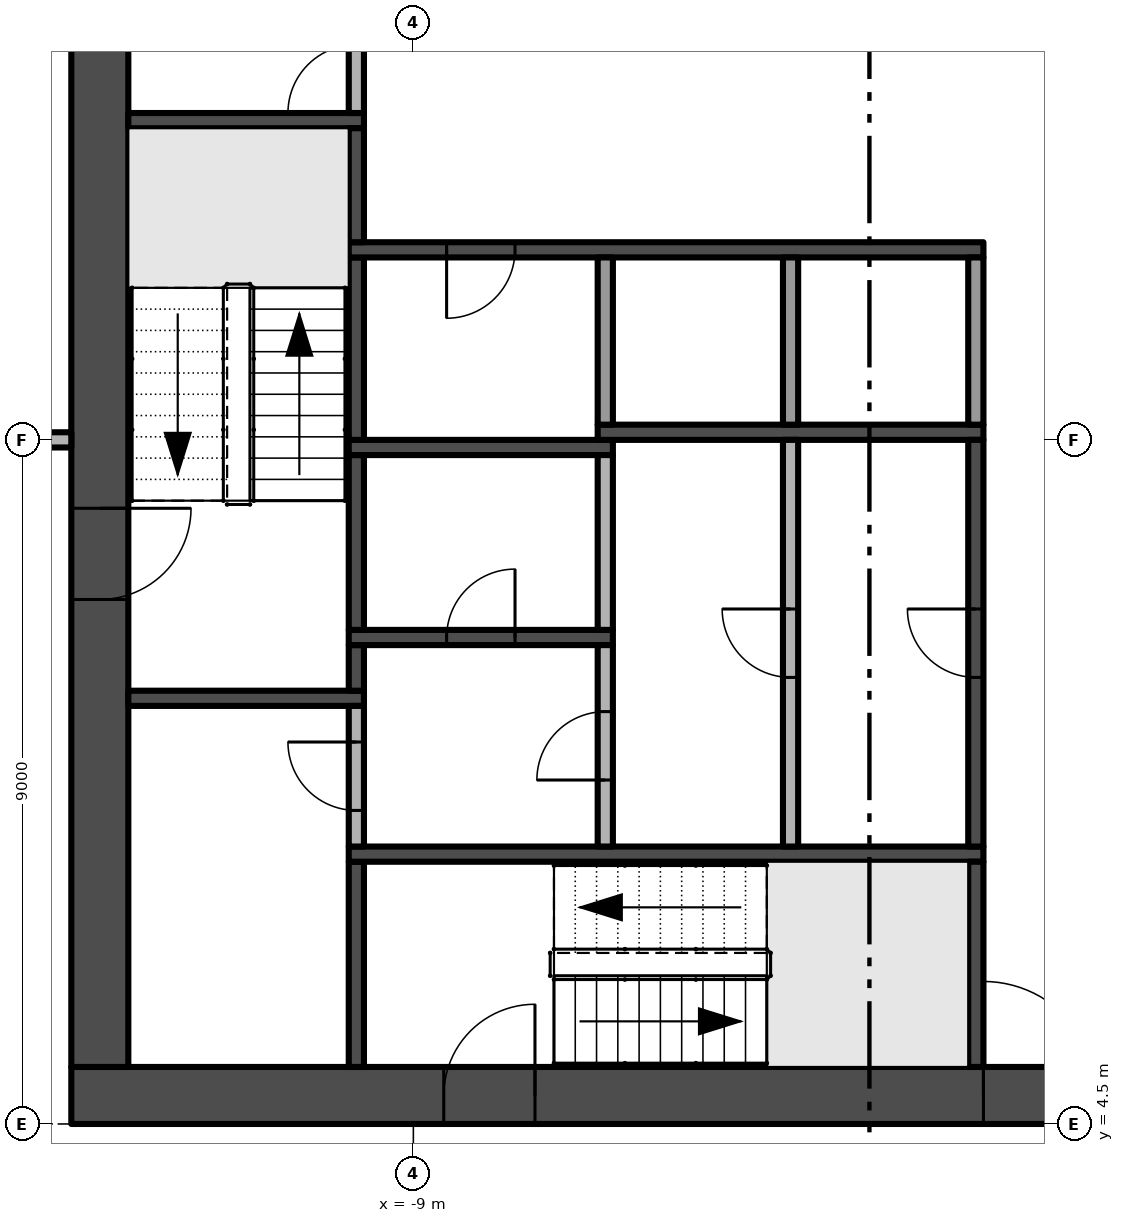
"""IFC4 building model, lengths in metres.
Left out: names, types, materials, properties, quantities, classifications, styles, units other than length and angle.
Written with IfcOpenShell. Run it as: python <this file> out.ifc"""

import sys

from ifc_helpers import new_model, si_unit, direction, frame, frame_2d, origin, place, context, subcontext, project, spatial, rectangle, extrude, element, fill, save


model = new_model("IFC4")
c1 = context("Model", 3, precision=1e-05, world=origin(), true_north=direction((0.0, 1.0)))
c2 = subcontext(c1, "Body", "Model", "MODEL_VIEW")
j1 = project(units=[si_unit("LENGTHUNIT", "METRE"), si_unit("PLANEANGLEUNIT", "RADIAN")], contexts=[c1])
p1 = place(None, origin())
s1 = spatial("IfcSite", under=j1, at=p1, CompositionType="ELEMENT")
p2 = place(p1, origin())
s2 = spatial("IfcBuilding", under=s1, at=p2, CompositionType="ELEMENT")
p3 = place(p2, frame((0.0, 0.0, 132.6)))
s3 = spatial("IfcBuildingStorey", under=s2, at=p3, CompositionType="ELEMENT", Elevation=132.6)
p4 = place(p3, frame((-13.5, 4.875, -0.3), z_axis=(0.0, 0.0, 1.0), x_axis=(1.0, 0.0, 0.0)))
e1 = element("IfcWall", 1, at=p4, inside=s3, PredefinedType="SHEAR", context=c2, shape_type="SweptSolid", body=[
    extrude(rectangle(XDim=27.0, YDim=0.75, at=frame_2d((13.5, 0.0))), origin(), (0.0, 0.0, 1.0), 3.8),
])
p5 = place(p4, frame((12.0, 0.0, 0.3)))
e2 = element("IfcOpeningElement", 2, at=p5, cuts=e1, PredefinedType="OPENING", context=c2, shape_type="SweptSolid", body=[
    extrude(rectangle(XDim=3.0, YDim=2.4, at=frame_2d((1.5, 1.2))), frame((0.0, 0.385, 0.0), z_axis=(0.0, -1.0, 0.0), x_axis=(1.0, 0.0, 0.0)), (0.0, 0.0, 1.0), 0.77),
])
p6 = place(p4, frame((4.9, 0.0, 0.3)))
e3 = element("IfcOpeningElement", 3, at=p6, cuts=e1, PredefinedType="OPENING", context=c2, shape_type="SweptSolid", body=[
    extrude(rectangle(XDim=1.2, YDim=2.2, at=frame_2d((0.6, 1.1))), frame((0.0, 0.385, 0.0), z_axis=(0.0, -1.0, 0.0), x_axis=(1.0, 0.0, 0.0)), (0.0, 0.0, 1.0), 0.77),
])
p7 = place(p4, frame((20.75, 0.0, 0.3)))
e4 = element("IfcOpeningElement", 4, at=p7, cuts=e1, PredefinedType="OPENING", context=c2, shape_type="SweptSolid", body=[
    extrude(rectangle(XDim=1.5, YDim=2.2, at=frame_2d((0.75, 1.1))), frame((0.0, 0.385, 0.0), z_axis=(0.0, -1.0, 0.0), x_axis=(1.0, 0.0, 0.0)), (0.0, 0.0, 1.0), 0.77),
])
p8 = place(p4, frame((17.4, 0.0, 0.3)))
e5 = element("IfcOpeningElement", 5, at=p8, cuts=e1, PredefinedType="OPENING", context=c2, shape_type="SweptSolid", body=[
    extrude(rectangle(XDim=1.2, YDim=2.2, at=frame_2d((0.6, 1.1))), frame((0.0, 0.385, 0.0), z_axis=(0.0, -1.0, 0.0), x_axis=(1.0, 0.0, 0.0)), (0.0, 0.0, 1.0), 0.77),
])
p9 = place(p3, frame((-13.125, 21.75, -0.3), z_axis=(0.0, 0.0, 1.0), x_axis=(0.0, -1.0, 0.0)))
e6 = element("IfcWall", 6, at=p9, inside=s3, PredefinedType="SHEAR", context=c2, shape_type="SweptSolid", body=[
    extrude(rectangle(XDim=16.5, YDim=0.75, at=frame_2d((8.25, 0.0))), origin(), (0.0, 0.0, 1.0), 3.8),
])
p10 = place(p9, frame((9.15, 0.0, 0.3)))
e7 = element("IfcOpeningElement", 7, at=p10, cuts=e6, PredefinedType="OPENING", context=c2, shape_type="SweptSolid", body=[
    extrude(rectangle(XDim=1.2, YDim=2.2, at=frame_2d((0.6, 1.1))), frame((0.0, 0.385, 0.0), z_axis=(0.0, -1.0, 0.0), x_axis=(1.0, 0.0, 0.0)), (0.0, 0.0, 1.0), 0.77),
])
for number, where, z_axis, x_axis in (
    (8, (-12.75, 10.1, 0.0), (0.0, 0.0, 1.0), (1.0, 0.0, 0.0)),
    (9, (-12.75, 17.7, 0.0), (0.0, 0.0, 1.0), (1.0, 0.0, 0.0)),
):
    element("IfcWall", number, at=place(p3, frame(where, z_axis=z_axis, x_axis=x_axis)), inside=s3, PredefinedType="SHEAR", context=c2, shape_type="SweptSolid", body=[
        extrude(rectangle(XDim=3.1, YDim=0.2, at=frame_2d((1.55, 0.0))), origin(), (0.0, 0.0, 1.0), 3.5),
    ])
p11 = place(p3, frame((-9.75, 5.25, 0.0), z_axis=(0.0, 0.0, 1.0), x_axis=(0.0, 1.0, 0.0)))
e10 = element("IfcWall", 10, at=p11, inside=s3, PredefinedType="SHEAR", context=c2, shape_type="SweptSolid", body=[
    extrude(rectangle(XDim=2.7, YDim=0.2, at=frame_2d((1.35, 0.0))), origin(), (0.0, 0.0, 1.0), 3.5),
])
p12 = place(p3, frame((-9.85, 8.05, 0.0), z_axis=(0.0, 0.0, 1.0), x_axis=(1.0, 0.0, 0.0)))
e11 = element("IfcWall", 11, at=p12, inside=s3, PredefinedType="SHEAR", context=c2, shape_type="SweptSolid", body=[
    extrude(rectangle(XDim=8.35, YDim=0.2, at=frame_2d((4.175, 0.0))), origin(), (0.0, 0.0, 1.0), 3.5),
])
p13 = place(p3, frame((-9.75, 8.15, 0.0), z_axis=(0.0, 0.0, 1.0), x_axis=(0.0, 1.0, 0.0)))
e12 = element("IfcWall", 12, at=p13, inside=s3, PredefinedType="PARTITIONING", context=c2, shape_type="SweptSolid", body=[
    extrude(rectangle(XDim=1.85, YDim=0.2, at=frame_2d((0.925, 0.0))), origin(), (0.0, 0.0, 1.0), 3.5),
])
p14 = place(p13, frame((0.475, 0.0, 0.0)))
e13 = element("IfcOpeningElement", 13, at=p14, cuts=e12, PredefinedType="OPENING", context=c2, shape_type="SweptSolid", body=[
    extrude(rectangle(XDim=0.9, YDim=2.1, at=frame_2d((0.45, 1.05))), frame((0.0, 0.11, 0.0), z_axis=(0.0, -1.0, 0.0), x_axis=(1.0, 0.0, 0.0)), (0.0, 0.0, 1.0), 0.22),
])
p15 = place(p3, frame((-9.75, 10.2, 0.0), z_axis=(0.0, 0.0, 1.0), x_axis=(0.0, 1.0, 0.0)))
e14 = element("IfcWall", 14, at=p15, inside=s3, PredefinedType="SHEAR", context=c2, shape_type="SweptSolid", body=[
    extrude(rectangle(XDim=0.6, YDim=0.2, at=frame_2d((0.3, 0.0))), origin(), (0.0, 0.0, 1.0), 3.5),
])
p16 = place(p3, frame((-9.85, 10.9, 0.0), z_axis=(0.0, 0.0, 1.0), x_axis=(1.0, 0.0, 0.0)))
e15 = element("IfcWall", 15, at=p16, inside=s3, PredefinedType="SHEAR", context=c2, shape_type="SweptSolid", body=[
    extrude(rectangle(XDim=3.475, YDim=0.2, at=frame_2d((1.738, 0.0))), origin(), (0.0, 0.0, 1.0), 3.5),
])
p17 = place(p16, frame((1.288, 0.0, 0.0)))
e16 = element("IfcOpeningElement", 16, at=p17, cuts=e15, PredefinedType="OPENING", context=c2, shape_type="SweptSolid", body=[
    extrude(rectangle(XDim=0.9, YDim=2.1, at=frame_2d((0.45, 1.05))), frame((0.0, 0.11, 0.0), z_axis=(0.0, -1.0, 0.0), x_axis=(1.0, 0.0, 0.0)), (0.0, 0.0, 1.0), 0.22),
])
p18 = place(p3, frame((-9.75, 11.0, 0.0), z_axis=(0.0, 0.0, 1.0), x_axis=(0.0, 1.0, 0.0)))
e17 = element("IfcWall", 17, at=p18, inside=s3, PredefinedType="SHEAR", context=c2, shape_type="SweptSolid", body=[
    extrude(rectangle(XDim=2.3, YDim=0.2, at=frame_2d((1.15, 0.0))), origin(), (0.0, 0.0, 1.0), 3.5),
])
p19 = place(p3, frame((-9.85, 13.4, 0.0), z_axis=(0.0, 0.0, 1.0), x_axis=(1.0, 0.0, 0.0)))
e18 = element("IfcWall", 18, at=p19, inside=s3, PredefinedType="SHEAR", context=c2, shape_type="SweptSolid", body=[
    extrude(rectangle(XDim=3.475, YDim=0.2, at=frame_2d((1.738, 0.0))), origin(), (0.0, 0.0, 1.0), 3.5),
])
p20 = place(p3, frame((-9.75, 13.5, 0.0), z_axis=(0.0, 0.0, 1.0), x_axis=(0.0, 1.0, 0.0)))
e19 = element("IfcWall", 19, at=p20, inside=s3, PredefinedType="SHEAR", context=c2, shape_type="SweptSolid", body=[
    extrude(rectangle(XDim=2.4, YDim=0.2, at=frame_2d((1.2, 0.0))), origin(), (0.0, 0.0, 1.0), 3.5),
])
p21 = place(p3, frame((-1.5, 16.0, 0.0), z_axis=(0.0, 0.0, 1.0), x_axis=(-1.0, 0.0, 0.0)))
e20 = element("IfcWall", 20, at=p21, inside=s3, PredefinedType="SHEAR", context=c2, shape_type="SweptSolid", body=[
    extrude(rectangle(XDim=8.35, YDim=0.2, at=frame_2d((4.175, 0.0))), origin(), (0.0, 0.0, 1.0), 3.5),
])
p22 = place(p21, frame((6.162, 0.0, 0.0)))
e21 = element("IfcOpeningElement", 21, at=p22, cuts=e20, PredefinedType="OPENING", context=c2, shape_type="SweptSolid", body=[
    extrude(rectangle(XDim=0.9, YDim=2.1, at=frame_2d((0.45, 1.05))), frame((0.0, 0.11, 0.0), z_axis=(0.0, -1.0, 0.0), x_axis=(1.0, 0.0, 0.0)), (0.0, 0.0, 1.0), 0.22),
])
p23 = place(p3, frame((-9.75, 16.1, 0.0), z_axis=(0.0, 0.0, 1.0), x_axis=(0.0, 1.0, 0.0)))
e22 = element("IfcWall", 22, at=p23, inside=s3, PredefinedType="SHEAR", context=c2, shape_type="SweptSolid", body=[
    extrude(rectangle(XDim=1.5, YDim=0.2, at=frame_2d((0.75, 0.0))), origin(), (0.0, 0.0, 1.0), 3.5),
])
p24 = place(p3, frame((-9.75, 17.8, 0.0), z_axis=(0.0, 0.0, 1.0), x_axis=(0.0, 1.0, 0.0)))
e23 = element("IfcWall", 23, at=p24, inside=s3, PredefinedType="PARTITIONING", context=c2, shape_type="SweptSolid", body=[
    extrude(rectangle(XDim=1.4, YDim=0.2, at=frame_2d((0.7, 0.0))), origin(), (0.0, 0.0, 1.0), 3.5),
])
p25 = place(p24, origin())
e24 = element("IfcOpeningElement", 24, at=p25, cuts=e23, PredefinedType="OPENING", context=c2, shape_type="SweptSolid", body=[
    extrude(rectangle(XDim=0.9, YDim=2.1, at=frame_2d((0.45, 1.05))), frame((0.0, 0.11, 0.0), z_axis=(0.0, -1.0, 0.0), x_axis=(1.0, 0.0, 0.0)), (0.0, 0.0, 1.0), 0.22),
])
p26 = place(p3, frame((-6.475, 8.15, 0.0), z_axis=(0.0, 0.0, 1.0), x_axis=(0.0, 1.0, 0.0)))
e25 = element("IfcWall", 25, at=p26, inside=s3, PredefinedType="PARTITIONING", context=c2, shape_type="SweptSolid", body=[
    extrude(rectangle(XDim=2.65, YDim=0.2, at=frame_2d((1.325, 0.0))), origin(), (0.0, 0.0, 1.0), 3.5),
])
p27 = place(p26, frame((0.875, 0.0, 0.0)))
e26 = element("IfcOpeningElement", 26, at=p27, cuts=e25, PredefinedType="OPENING", context=c2, shape_type="SweptSolid", body=[
    extrude(rectangle(XDim=0.9, YDim=2.1, at=frame_2d((0.45, 1.05))), frame((0.0, 0.11, 0.0), z_axis=(0.0, -1.0, 0.0), x_axis=(1.0, 0.0, 0.0)), (0.0, 0.0, 1.0), 0.22),
])
p28 = place(p3, frame((-6.475, 11.0, 0.0), z_axis=(0.0, 0.0, 1.0), x_axis=(0.0, 1.0, 0.0)))
e27 = element("IfcWall", 27, at=p28, inside=s3, PredefinedType="PARTITIONING", context=c2, shape_type="SweptSolid", body=[
    extrude(rectangle(XDim=2.3, YDim=0.2, at=frame_2d((1.15, 0.0))), origin(), (0.0, 0.0, 1.0), 3.5),
])
p29 = place(p3, frame((-6.575, 13.6, 0.0), z_axis=(0.0, 0.0, 1.0), x_axis=(1.0, 0.0, 0.0)))
e28 = element("IfcWall", 28, at=p29, inside=s3, PredefinedType="SHEAR", context=c2, shape_type="SweptSolid", body=[
    extrude(rectangle(XDim=5.075, YDim=0.2, at=frame_2d((2.538, 0.0))), origin(), (0.0, 0.0, 1.0), 3.5),
])
p30 = place(p3, frame((-6.475, 13.7, 0.0), z_axis=(0.0, 0.0, 1.0), x_axis=(0.0, 1.0, 0.0)))
e29 = element("IfcWall", 29, at=p30, inside=s3, PredefinedType="PARTITIONING", context=c2, shape_type="SweptSolid", body=[
    extrude(rectangle(XDim=2.2, YDim=0.2, at=frame_2d((1.1, 0.0))), origin(), (0.0, 0.0, 1.0), 3.5),
])
p31 = place(p3, frame((-4.037, 8.15, 0.0), z_axis=(0.0, 0.0, 1.0), x_axis=(0.0, 1.0, 0.0)))
e30 = element("IfcWall", 30, at=p31, inside=s3, PredefinedType="PARTITIONING", context=c2, shape_type="SweptSolid", body=[
    extrude(rectangle(XDim=5.35, YDim=0.2, at=frame_2d((2.675, 0.0))), origin(), (0.0, 0.0, 1.0), 3.5),
])
p32 = place(p31, frame((2.225, 0.0, 0.0)))
e31 = element("IfcOpeningElement", 31, at=p32, cuts=e30, PredefinedType="OPENING", context=c2, shape_type="SweptSolid", body=[
    extrude(rectangle(XDim=0.9, YDim=2.1, at=frame_2d((0.45, 1.05))), frame((0.0, 0.11, 0.0), z_axis=(0.0, -1.0, 0.0), x_axis=(1.0, 0.0, 0.0)), (0.0, 0.0, 1.0), 0.22),
])
p33 = place(p3, frame((-4.037, 13.7, 0.0), z_axis=(0.0, 0.0, 1.0), x_axis=(0.0, 1.0, 0.0)))
e32 = element("IfcWall", 32, at=p33, inside=s3, PredefinedType="PARTITIONING", context=c2, shape_type="SweptSolid", body=[
    extrude(rectangle(XDim=2.2, YDim=0.2, at=frame_2d((1.1, 0.0))), origin(), (0.0, 0.0, 1.0), 3.5),
])
p34 = place(p3, frame((-1.6, 5.25, 0.0), z_axis=(0.0, 0.0, 1.0), x_axis=(0.0, 1.0, 0.0)))
e33 = element("IfcWall", 33, at=p34, inside=s3, PredefinedType="SHEAR", context=c2, shape_type="SweptSolid", body=[
    extrude(rectangle(XDim=2.7, YDim=0.2, at=frame_2d((1.35, 0.0))), origin(), (0.0, 0.0, 1.0), 3.5),
])
p35 = place(p3, frame((-1.6, 8.15, 0.0), z_axis=(0.0, 0.0, 1.0), x_axis=(0.0, 1.0, 0.0)))
e34 = element("IfcWall", 34, at=p35, inside=s3, PredefinedType="SHEAR", context=c2, shape_type="SweptSolid", body=[
    extrude(rectangle(XDim=5.35, YDim=0.2, at=frame_2d((2.675, 0.0))), origin(), (0.0, 0.0, 1.0), 3.5),
])
p36 = place(p35, frame((2.225, 0.0, 0.0)))
e35 = element("IfcOpeningElement", 35, at=p36, cuts=e34, PredefinedType="OPENING", context=c2, shape_type="SweptSolid", body=[
    extrude(rectangle(XDim=0.9, YDim=2.1, at=frame_2d((0.45, 1.05))), frame((0.0, 0.11, 0.0), z_axis=(0.0, -1.0, 0.0), x_axis=(1.0, 0.0, 0.0)), (0.0, 0.0, 1.0), 0.22),
])
p37 = place(p3, frame((-1.6, 13.7, 0.0), z_axis=(0.0, 0.0, 1.0), x_axis=(0.0, 1.0, 0.0)))
e36 = element("IfcWall", 36, at=p37, inside=s3, PredefinedType="PARTITIONING", context=c2, shape_type="SweptSolid", body=[
    extrude(rectangle(XDim=2.2, YDim=0.2, at=frame_2d((1.1, 0.0))), origin(), (0.0, 0.0, 1.0), 3.5),
])
p38 = place(p3, frame((-17.35, 13.5, 0.0), z_axis=(0.0, 0.0, 1.0), x_axis=(1.0, 0.0, 0.0)))
e37 = element("IfcWall", 37, at=p38, inside=s3, PredefinedType="PARTITIONING", context=c2, shape_type="SweptSolid", body=[
    extrude(rectangle(XDim=3.85, YDim=0.2, at=frame_2d((1.925, 0.0))), origin(), (0.0, 0.0, 1.0), 3.5),
])
p39 = place(p38, frame((1.35, 0.0, 0.0)))
e38 = element("IfcOpeningElement", 38, at=p39, cuts=e37, PredefinedType="OPENING", context=c2, shape_type="SweptSolid", body=[
    extrude(rectangle(XDim=0.9, YDim=2.1, at=frame_2d((0.45, 1.05))), frame((0.0, 0.11, 0.0), z_axis=(0.0, -1.0, 0.0), x_axis=(1.0, 0.0, 0.0)), (0.0, 0.0, 1.0), 0.22),
])
p40 = place(p5, frame((3.0, 0.0, 0.0), z_axis=(0.0, 0.0, 1.0), x_axis=(-1.0, 0.0, 0.0)))
e39 = element("IfcDoor", 39, at=p40, inside=s3, OperationType="DOUBLE_DOOR_SINGLE_SWING", PredefinedType="DOOR", context=c2, shape_type="SweptSolid", body=[
    extrude(rectangle(XDim=3.0, YDim=2.4, at=frame_2d((1.5, 1.2))), frame((0.0, 0.025, 0.0), z_axis=(0.0, -1.0, 0.0), x_axis=(1.0, 0.0, 0.0)), (0.0, 0.0, 1.0), 0.05),
])
fill(e2, e39)
p41 = place(p10, frame((1.2, 0.0, 0.0), z_axis=(0.0, 0.0, 1.0), x_axis=(-1.0, 0.0, 0.0)))
e40 = element("IfcDoor", 40, at=p41, inside=s3, OperationType="SINGLE_SWING_RIGHT", PredefinedType="DOOR", context=c2, shape_type="SweptSolid", body=[
    extrude(rectangle(XDim=1.2, YDim=2.2, at=frame_2d((0.6, 1.1))), frame((0.0, 0.025, 0.0), z_axis=(0.0, -1.0, 0.0), x_axis=(1.0, 0.0, 0.0)), (0.0, 0.0, 1.0), 0.05),
])
fill(e7, e40)
p42 = place(p6, frame((1.2, 0.0, 0.0), z_axis=(0.0, 0.0, 1.0), x_axis=(-1.0, 0.0, 0.0)))
e41 = element("IfcDoor", 41, at=p42, inside=s3, OperationType="SINGLE_SWING_LEFT", PredefinedType="DOOR", context=c2, shape_type="SweptSolid", body=[
    extrude(rectangle(XDim=1.2, YDim=2.2, at=frame_2d((0.6, 1.1))), frame((0.0, 0.025, 0.0), z_axis=(0.0, -1.0, 0.0), x_axis=(1.0, 0.0, 0.0)), (0.0, 0.0, 1.0), 0.05),
])
fill(e3, e41)
p43 = place(p22, origin())
e42 = element("IfcDoor", 42, at=p43, inside=s3, OperationType="SINGLE_SWING_RIGHT", PredefinedType="DOOR", context=c2, shape_type="SweptSolid", body=[
    extrude(rectangle(XDim=0.9, YDim=2.1, at=frame_2d((0.45, 1.05))), frame((0.0, 0.025, 0.0), z_axis=(0.0, -1.0, 0.0), x_axis=(1.0, 0.0, 0.0)), (0.0, 0.0, 1.0), 0.05),
])
fill(e21, e42)
p44 = place(p36, origin())
e43 = element("IfcDoor", 43, at=p44, inside=s3, OperationType="SINGLE_SWING_RIGHT", PredefinedType="DOOR", context=c2, shape_type="SweptSolid", body=[
    extrude(rectangle(XDim=0.9, YDim=2.1, at=frame_2d((0.45, 1.05))), frame((0.0, 0.025, 0.0), z_axis=(0.0, -1.0, 0.0), x_axis=(1.0, 0.0, 0.0)), (0.0, 0.0, 1.0), 0.05),
])
fill(e35, e43)
p45 = place(p25, origin())
e44 = element("IfcDoor", 44, at=p45, inside=s3, OperationType="SINGLE_SWING_LEFT", PredefinedType="DOOR", context=c2, shape_type="SweptSolid", body=[
    extrude(rectangle(XDim=0.9, YDim=2.1, at=frame_2d((0.45, 1.05))), frame((0.0, 0.025, 0.0), z_axis=(0.0, -1.0, 0.0), x_axis=(1.0, 0.0, 0.0)), (0.0, 0.0, 1.0), 0.05),
])
fill(e24, e44)
p46 = place(p32, origin())
e45 = element("IfcDoor", 45, at=p46, inside=s3, OperationType="SINGLE_SWING_RIGHT", PredefinedType="DOOR", context=c2, shape_type="SweptSolid", body=[
    extrude(rectangle(XDim=0.9, YDim=2.1, at=frame_2d((0.45, 1.05))), frame((0.0, 0.025, 0.0), z_axis=(0.0, -1.0, 0.0), x_axis=(1.0, 0.0, 0.0)), (0.0, 0.0, 1.0), 0.05),
])
fill(e31, e45)
p47 = place(p27, origin())
e46 = element("IfcDoor", 46, at=p47, inside=s3, OperationType="SINGLE_SWING_LEFT", PredefinedType="DOOR", context=c2, shape_type="SweptSolid", body=[
    extrude(rectangle(XDim=0.9, YDim=2.1, at=frame_2d((0.45, 1.05))), frame((0.0, 0.025, 0.0), z_axis=(0.0, -1.0, 0.0), x_axis=(1.0, 0.0, 0.0)), (0.0, 0.0, 1.0), 0.05),
])
fill(e26, e46)
p48 = place(p17, origin())
e47 = element("IfcDoor", 47, at=p48, inside=s3, OperationType="SINGLE_SWING_RIGHT", PredefinedType="DOOR", context=c2, shape_type="SweptSolid", body=[
    extrude(rectangle(XDim=0.9, YDim=2.1, at=frame_2d((0.45, 1.05))), frame((0.0, 0.025, 0.0), z_axis=(0.0, -1.0, 0.0), x_axis=(1.0, 0.0, 0.0)), (0.0, 0.0, 1.0), 0.05),
])
fill(e16, e47)
p49 = place(p14, origin())
e48 = element("IfcDoor", 48, at=p49, inside=s3, OperationType="SINGLE_SWING_RIGHT", PredefinedType="DOOR", context=c2, shape_type="SweptSolid", body=[
    extrude(rectangle(XDim=0.9, YDim=2.1, at=frame_2d((0.45, 1.05))), frame((0.0, 0.025, 0.0), z_axis=(0.0, -1.0, 0.0), x_axis=(1.0, 0.0, 0.0)), (0.0, 0.0, 1.0), 0.05),
])
fill(e13, e48)
save(model, sys.argv[1])
